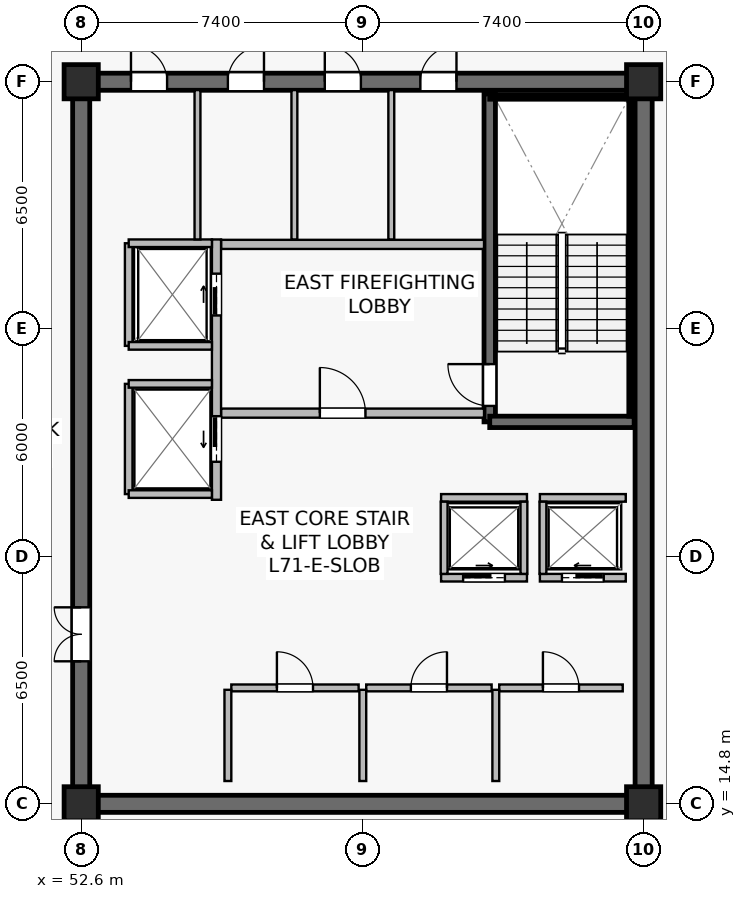
"""IFC4 building model, lengths in metres.
Left out: names, types, materials, properties, quantities, classifications, styles, units other than length and angle.
Written with IfcOpenShell. Run it as: python <this file> out.ifc"""

import sys

from ifc_helpers import new_model, si_unit, direction, frame, frame_2d, origin, origin_2d, place, context, subcontext, project, spatial, rectangle, extrude, source, transform, mapped, element, fill, save


model = new_model("IFC4")
c1 = context("Model", 3, precision=1e-05, world=origin(), true_north=direction((0.0, 1.0)))
c2 = subcontext(c1, "Body", "Model", "MODEL_VIEW")
j1 = project(units=[si_unit("LENGTHUNIT", "METRE"), si_unit("PLANEANGLEUNIT", "RADIAN")], contexts=[c1])
p1 = place(None, origin())
s1 = spatial("IfcSite", under=j1, at=p1, CompositionType="ELEMENT")
p2 = place(p1, origin())
s2 = spatial("IfcBuilding", under=s1, at=p2, CompositionType="ELEMENT")
p3 = place(p2, frame((0.0, 0.0, 297.6)))
s3 = spatial("IfcBuildingStorey", under=s2, at=p3, CompositionType="ELEMENT", Elevation=297.6)
p4 = place(p3, frame((52.375, 14.8, 0.0), z_axis=(0.0, 0.0, 1.0), x_axis=(1.0, 0.0, 0.0)))
e1 = element("IfcWall", 1, at=p4, inside=s3, PredefinedType="SHEAR", context=c2, shape_type="SweptSolid", body=[
    extrude(rectangle(XDim=15.25, YDim=0.45, at=frame_2d((7.625, 0.0))), origin(), (0.0, 0.0, 1.0), 3.9),
])
p5 = place(p3, frame((52.375, 33.8, 0.0), z_axis=(0.0, 0.0, 1.0), x_axis=(1.0, 0.0, 0.0)))
e2 = element("IfcWall", 2, at=p5, inside=s3, PredefinedType="SHEAR", context=c2, shape_type="SweptSolid", body=[
    extrude(rectangle(XDim=15.25, YDim=0.45, at=frame_2d((7.625, 0.0))), origin(), (0.0, 0.0, 1.0), 3.9),
])
p6 = place(p5, frame((9.15, 0.0, 0.0)))
e3 = element("IfcOpeningElement", 3, at=p6, cuts=e2, PredefinedType="OPENING", context=c2, shape_type="SweptSolid", body=[
    extrude(rectangle(XDim=0.95, YDim=2.15, at=frame_2d((0.475, 1.075))), frame((0.0, 0.235, 0.0), z_axis=(0.0, -1.0, 0.0), x_axis=(1.0, 0.0, 0.0)), (0.0, 0.0, 1.0), 0.47),
])
p7 = place(p5, frame((6.635, 0.0, 0.0)))
e4 = element("IfcOpeningElement", 4, at=p7, cuts=e2, PredefinedType="OPENING", context=c2, shape_type="SweptSolid", body=[
    extrude(rectangle(XDim=0.95, YDim=2.15, at=frame_2d((0.475, 1.075))), frame((0.0, 0.235, 0.0), z_axis=(0.0, -1.0, 0.0), x_axis=(1.0, 0.0, 0.0)), (0.0, 0.0, 1.0), 0.47),
])
p8 = place(p5, frame((4.085, 0.0, 0.0)))
e5 = element("IfcOpeningElement", 5, at=p8, cuts=e2, PredefinedType="OPENING", context=c2, shape_type="SweptSolid", body=[
    extrude(rectangle(XDim=0.95, YDim=2.15, at=frame_2d((0.475, 1.075))), frame((0.0, 0.235, 0.0), z_axis=(0.0, -1.0, 0.0), x_axis=(1.0, 0.0, 0.0)), (0.0, 0.0, 1.0), 0.47),
])
p9 = place(p5, frame((1.535, 0.0, 0.0)))
e6 = element("IfcOpeningElement", 6, at=p9, cuts=e2, PredefinedType="OPENING", context=c2, shape_type="SweptSolid", body=[
    extrude(rectangle(XDim=0.95, YDim=2.15, at=frame_2d((0.475, 1.075))), frame((0.0, 0.235, 0.0), z_axis=(0.0, -1.0, 0.0), x_axis=(1.0, 0.0, 0.0)), (0.0, 0.0, 1.0), 0.47),
])
p10 = place(p3, frame((52.6, 15.025, 0.0), z_axis=(0.0, 0.0, 1.0), x_axis=(0.0, 1.0, 0.0)))
e7 = element("IfcWall", 7, at=p10, inside=s3, PredefinedType="SHEAR", context=c2, shape_type="SweptSolid", body=[
    extrude(rectangle(XDim=18.55, YDim=0.45, at=frame_2d((9.275, 0.0))), origin(), (0.0, 0.0, 1.0), 3.9),
])
p11 = place(p10, frame((3.525, 0.0, 0.0)))
e8 = element("IfcOpeningElement", 8, at=p11, cuts=e7, PredefinedType="OPENING", context=c2, shape_type="SweptSolid", body=[
    extrude(rectangle(XDim=1.42, YDim=2.2, at=frame_2d((0.71, 1.1))), frame((0.0, 0.235, 0.0), z_axis=(0.0, -1.0, 0.0), x_axis=(1.0, 0.0, 0.0)), (0.0, 0.0, 1.0), 0.47),
])
p12 = place(p3, frame((67.4, 15.025, 0.0), z_axis=(0.0, 0.0, 1.0), x_axis=(0.0, 1.0, 0.0)))
e9 = element("IfcWall", 9, at=p12, inside=s3, PredefinedType="SHEAR", context=c2, shape_type="SweptSolid", body=[
    extrude(rectangle(XDim=18.55, YDim=0.45, at=frame_2d((9.275, 0.0))), origin(), (0.0, 0.0, 1.0), 3.9),
])
p13 = place(p3, frame((63.35, 24.85, 0.0), z_axis=(0.0, 0.0, 1.0), x_axis=(0.0, 1.0, 0.0)))
e10 = element("IfcWall", 10, at=p13, inside=s3, PredefinedType="SHEAR", context=c2, shape_type="SweptSolid", body=[
    extrude(rectangle(XDim=8.63, YDim=0.3, at=frame_2d((4.315, 0.0))), origin(), (0.0, 0.0, 1.0), 3.9),
])
p14 = place(p13, frame((0.42, 0.0, 0.0)))
e11 = element("IfcOpeningElement", 11, at=p14, cuts=e10, PredefinedType="OPENING", context=c2, shape_type="SweptSolid", body=[
    extrude(rectangle(XDim=1.1, YDim=2.15, at=frame_2d((0.55, 1.075))), frame((0.0, 0.16, 0.0), z_axis=(0.0, -1.0, 0.0), x_axis=(1.0, 0.0, 0.0)), (0.0, 0.0, 1.0), 0.32),
])
p15 = place(p3, frame((63.35, 24.85, 0.0), z_axis=(0.0, 0.0, 1.0), x_axis=(1.0, 0.0, 0.0)))
e12 = element("IfcWall", 12, at=p15, inside=s3, PredefinedType="SHEAR", context=c2, shape_type="SweptSolid", body=[
    extrude(rectangle(XDim=3.8, YDim=0.3, at=frame_2d((1.9, 0.0))), origin(), (0.0, 0.0, 1.0), 3.9),
])
p16 = place(p3, frame((63.35, 33.4, 0.0), z_axis=(0.0, 0.0, 1.0), x_axis=(1.0, 0.0, 0.0)))
e13 = element("IfcWall", 13, at=p16, inside=s3, PredefinedType="SOLIDWALL", context=c2, shape_type="SweptSolid", body=[
    extrude(rectangle(XDim=3.72, YDim=0.12, at=frame_2d((1.86, 0.0))), origin(), (0.0, 0.0, 1.0), 3.9),
])
p17 = place(p3, frame((67.07, 25.0, 0.0), z_axis=(0.0, 0.0, 1.0), x_axis=(0.0, 1.0, 0.0)))
e14 = element("IfcWall", 14, at=p17, inside=s3, PredefinedType="SOLIDWALL", context=c2, shape_type="SweptSolid", body=[
    extrude(rectangle(XDim=8.32, YDim=0.12, at=frame_2d((4.16, 0.0))), origin(), (0.0, 0.0, 1.0), 3.9),
])
m1 = source(origin(), c2, "Body", "SweptSolid", [
    extrude(rectangle(XDim=0.9, YDim=0.9, at=origin_2d()), origin(), (0.0, 0.0, 1.0), 4.2),
])
for number, where, z_axis, x_axis in (
    (15, (52.6, 14.8, 0.0), (0.0, 0.0, 1.0), (1.0, 0.0, 0.0)),
    (16, (67.4, 14.8, 0.0), (0.0, 0.0, 1.0), (1.0, 0.0, 0.0)),
    (17, (52.6, 33.8, 0.0), (0.0, 0.0, 1.0), (1.0, 0.0, 0.0)),
    (18, (67.4, 33.8, 0.0), (0.0, 0.0, 1.0), (1.0, 0.0, 0.0)),
):
    element("IfcColumn", number, at=place(p3, frame(where, z_axis=z_axis, x_axis=x_axis)), inside=s3, PredefinedType="COLUMN", context=c2, shape_type="MappedRepresentation", body=[
        mapped(m1, transform((0.0, 0.0, 0.0), scale=1.0)),
    ])
p18 = place(p3, frame((56.28, 25.08, 0.0), z_axis=(0.0, 0.0, 1.0), x_axis=(1.0, 0.0, 0.0)))
e19 = element("IfcWall", 19, at=p18, inside=s3, PredefinedType="SOLIDWALL", context=c2, shape_type="SweptSolid", body=[
    extrude(rectangle(XDim=6.92, YDim=0.24, at=frame_2d((3.46, 0.0))), origin(), (0.0, 0.0, 1.0), 3.297),
])
p19 = place(p18, frame((2.6, 0.0, 0.0)))
e20 = element("IfcOpeningElement", 20, at=p19, cuts=e19, PredefinedType="OPENING", context=c2, shape_type="SweptSolid", body=[
    extrude(rectangle(XDim=1.2, YDim=2.16, at=frame_2d((0.6, 1.08))), frame((0.0, 0.13, 0.0), z_axis=(0.0, -1.0, 0.0), x_axis=(1.0, 0.0, 0.0)), (0.0, 0.0, 1.0), 0.26),
])
p20 = place(p3, frame((56.28, 29.52, 0.0), z_axis=(0.0, 0.0, 1.0), x_axis=(1.0, 0.0, 0.0)))
e21 = element("IfcWall", 21, at=p20, inside=s3, PredefinedType="SOLIDWALL", context=c2, shape_type="SweptSolid", body=[
    extrude(rectangle(XDim=6.92, YDim=0.24, at=frame_2d((3.46, 0.0))), origin(), (0.0, 0.0, 1.0), 3.297),
])
p21 = place(p3, frame((56.16, 22.8, 0.0), z_axis=(0.0, 0.0, 1.0), x_axis=(0.0, 1.0, 0.0)))
e22 = element("IfcWall", 22, at=p21, inside=s3, PredefinedType="SOLIDWALL", context=c2, shape_type="SweptSolid", body=[
    extrude(rectangle(XDim=6.85, YDim=0.24, at=frame_2d((3.425, 0.0))), origin(), (0.0, 0.0, 1.0), 3.035),
])
p22 = place(p21, frame((4.85, 0.0, 0.0)))
e23 = element("IfcOpeningElement", 23, at=p22, cuts=e22, PredefinedType="OPENING", context=c2, shape_type="SweptSolid", body=[
    extrude(rectangle(XDim=1.1, YDim=2.22, at=frame_2d((0.55, 1.11))), frame((0.0, 0.13, 0.0), z_axis=(0.0, -1.0, 0.0), x_axis=(1.0, 0.0, 0.0)), (0.0, 0.0, 1.0), 0.26),
])
p23 = place(p21, frame((1.0, 0.0, 0.0)))
e24 = element("IfcOpeningElement", 24, at=p23, cuts=e22, PredefinedType="OPENING", context=c2, shape_type="SweptSolid", body=[
    extrude(rectangle(XDim=1.2, YDim=2.22, at=frame_2d((0.6, 1.11))), frame((0.0, 0.13, 0.0), z_axis=(0.0, -1.0, 0.0), x_axis=(1.0, 0.0, 0.0)), (0.0, 0.0, 1.0), 0.26),
])
p24 = place(p3, frame((64.67, 20.75, 0.0), z_axis=(0.0, 0.0, 1.0), x_axis=(1.0, 0.0, 0.0)))
e25 = element("IfcWall", 25, at=p24, inside=s3, PredefinedType="SOLIDWALL", context=c2, shape_type="SweptSolid", body=[
    extrude(rectangle(XDim=2.26, YDim=0.2, at=frame_2d((1.13, 0.0))), origin(), (0.0, 0.0, 1.0), 3.9),
])
p25 = place(p24, frame((0.58, 0.0, 0.0)))
e26 = element("IfcOpeningElement", 26, at=p25, cuts=e25, PredefinedType="OPENING", context=c2, shape_type="SweptSolid", body=[
    extrude(rectangle(XDim=1.1, YDim=2.22, at=frame_2d((0.55, 1.11))), frame((0.0, 0.11, 0.0), z_axis=(0.0, -1.0, 0.0), x_axis=(1.0, 0.0, 0.0)), (0.0, 0.0, 1.0), 0.22),
])
p26 = place(p3, frame((64.67, 22.85, 0.0), z_axis=(0.0, 0.0, 1.0), x_axis=(1.0, 0.0, 0.0)))
e27 = element("IfcWall", 27, at=p26, inside=s3, PredefinedType="SOLIDWALL", context=c2, shape_type="SweptSolid", body=[
    extrude(rectangle(XDim=2.26, YDim=0.2, at=frame_2d((1.13, 0.0))), origin(), (0.0, 0.0, 1.0), 3.9),
])
p27 = place(p3, frame((64.75, 20.85, 0.0), z_axis=(0.0, 0.0, 1.0), x_axis=(0.0, 1.0, 0.0)))
e28 = element("IfcWall", 28, at=p27, inside=s3, PredefinedType="SOLIDWALL", context=c2, shape_type="SweptSolid", body=[
    extrude(rectangle(XDim=1.9, YDim=0.18, at=frame_2d((0.95, 0.0))), origin(), (0.0, 0.0, 1.0), 3.9),
])
p28 = place(p3, frame((62.07, 20.75, 0.0), z_axis=(0.0, 0.0, 1.0), x_axis=(1.0, 0.0, 0.0)))
e29 = element("IfcWall", 29, at=p28, inside=s3, PredefinedType="SOLIDWALL", context=c2, shape_type="SweptSolid", body=[
    extrude(rectangle(XDim=2.26, YDim=0.2, at=frame_2d((1.13, 0.0))), origin(), (0.0, 0.0, 1.0), 3.9),
])
p29 = place(p28, frame((0.58, 0.0, 0.0)))
e30 = element("IfcOpeningElement", 30, at=p29, cuts=e29, PredefinedType="OPENING", context=c2, shape_type="SweptSolid", body=[
    extrude(rectangle(XDim=1.1, YDim=2.22, at=frame_2d((0.55, 1.11))), frame((0.0, 0.11, 0.0), z_axis=(0.0, -1.0, 0.0), x_axis=(1.0, 0.0, 0.0)), (0.0, 0.0, 1.0), 0.22),
])
p30 = place(p3, frame((62.07, 22.85, 0.0), z_axis=(0.0, 0.0, 1.0), x_axis=(1.0, 0.0, 0.0)))
e31 = element("IfcWall", 31, at=p30, inside=s3, PredefinedType="SOLIDWALL", context=c2, shape_type="SweptSolid", body=[
    extrude(rectangle(XDim=2.26, YDim=0.2, at=frame_2d((1.13, 0.0))), origin(), (0.0, 0.0, 1.0), 3.9),
])
for number, where, z_axis, x_axis in (
    (32, (62.15, 20.85, 0.0), (0.0, 0.0, 1.0), (0.0, 1.0, 0.0)),
    (33, (64.25, 20.85, 0.0), (0.0, 0.0, 1.0), (0.0, 1.0, 0.0)),
):
    element("IfcWall", number, at=place(p3, frame(where, z_axis=z_axis, x_axis=x_axis)), inside=s3, PredefinedType="SOLIDWALL", context=c2, shape_type="SweptSolid", body=[
        extrude(rectangle(XDim=1.9, YDim=0.18, at=frame_2d((0.95, 0.0))), origin(), (0.0, 0.0, 1.0), 3.9),
    ])
p31 = place(p3, frame((53.85, 26.85, 0.0), z_axis=(0.0, 0.0, 1.0), x_axis=(0.0, 1.0, 0.0)))
e34 = element("IfcWall", 34, at=p31, inside=s3, PredefinedType="SOLIDWALL", context=c2, shape_type="SweptSolid", body=[
    extrude(rectangle(XDim=2.7, YDim=0.2, at=frame_2d((1.35, 0.0))), origin(), (0.0, 0.0, 1.0), 3.9),
])
p32 = place(p3, frame((53.85, 29.55, 0.0), z_axis=(0.0, 0.0, 1.0), x_axis=(1.0, 0.0, 0.0)))
e35 = element("IfcWall", 35, at=p32, inside=s3, PredefinedType="SOLIDWALL", context=c2, shape_type="SweptSolid", body=[
    extrude(rectangle(XDim=2.19, YDim=0.2, at=frame_2d((1.095, 0.0))), origin(), (0.0, 0.0, 1.0), 3.9),
])
p33 = place(p3, frame((53.85, 26.85, 0.0), z_axis=(0.0, 0.0, 1.0), x_axis=(1.0, 0.0, 0.0)))
e36 = element("IfcWall", 36, at=p33, inside=s3, PredefinedType="SOLIDWALL", context=c2, shape_type="SweptSolid", body=[
    extrude(rectangle(XDim=2.19, YDim=0.2, at=frame_2d((1.095, 0.0))), origin(), (0.0, 0.0, 1.0), 3.297),
])
p34 = place(p3, frame((53.85, 22.95, 0.0), z_axis=(0.0, 0.0, 1.0), x_axis=(0.0, 1.0, 0.0)))
e37 = element("IfcWall", 37, at=p34, inside=s3, PredefinedType="SOLIDWALL", context=c2, shape_type="SweptSolid", body=[
    extrude(rectangle(XDim=2.9, YDim=0.2, at=frame_2d((1.45, 0.0))), origin(), (0.0, 0.0, 1.0), 3.035),
])
for number, where, z_axis, x_axis in (
    (38, (53.85, 25.85, 0.0), (0.0, 0.0, 1.0), (1.0, 0.0, 0.0)),
    (39, (53.85, 22.95, 0.0), (0.0, 0.0, 1.0), (1.0, 0.0, 0.0)),
):
    element("IfcWall", number, at=place(p3, frame(where, z_axis=z_axis, x_axis=x_axis)), inside=s3, PredefinedType="SOLIDWALL", context=c2, shape_type="SweptSolid", body=[
        extrude(rectangle(XDim=2.19, YDim=0.2, at=frame_2d((1.095, 0.0))), origin(), (0.0, 0.0, 1.0), 3.9),
    ])
p35 = place(p3, frame((63.6, 17.85, 0.0), z_axis=(0.0, 0.0, 1.0), x_axis=(1.0, 0.0, 0.0)))
e40 = element("IfcWall", 40, at=p35, inside=s3, PredefinedType="SOLIDWALL", context=c2, shape_type="SweptSolid", body=[
    extrude(rectangle(XDim=3.25, YDim=0.18, at=frame_2d((1.625, 0.0))), origin(), (0.0, 0.0, 1.0), 3.9),
])
p36 = place(p35, frame((1.15, 0.0, 0.0)))
e41 = element("IfcOpeningElement", 41, at=p36, cuts=e40, PredefinedType="OPENING", context=c2, shape_type="SweptSolid", body=[
    extrude(rectangle(XDim=0.95, YDim=2.15, at=frame_2d((0.475, 1.075))), frame((0.0, 0.1, 0.0), z_axis=(0.0, -1.0, 0.0), x_axis=(1.0, 0.0, 0.0)), (0.0, 0.0, 1.0), 0.2),
])
p37 = place(p3, frame((63.51, 15.4, 0.0), z_axis=(0.0, 0.0, 1.0), x_axis=(0.0, 1.0, 0.0)))
e42 = element("IfcWall", 42, at=p37, inside=s3, PredefinedType="SOLIDWALL", context=c2, shape_type="SweptSolid", body=[
    extrude(rectangle(XDim=2.4, YDim=0.18, at=frame_2d((1.2, 0.0))), origin(), (0.0, 0.0, 1.0), 3.9),
])
p38 = place(p3, frame((60.1, 17.85, 0.0), z_axis=(0.0, 0.0, 1.0), x_axis=(1.0, 0.0, 0.0)))
e43 = element("IfcWall", 43, at=p38, inside=s3, PredefinedType="SOLIDWALL", context=c2, shape_type="SweptSolid", body=[
    extrude(rectangle(XDim=3.3, YDim=0.18, at=frame_2d((1.65, 0.0))), origin(), (0.0, 0.0, 1.0), 3.297),
])
p39 = place(p38, frame((1.175, 0.0, 0.0)))
e44 = element("IfcOpeningElement", 44, at=p39, cuts=e43, PredefinedType="OPENING", context=c2, shape_type="SweptSolid", body=[
    extrude(rectangle(XDim=0.95, YDim=2.15, at=frame_2d((0.475, 1.075))), frame((0.0, 0.1, 0.0), z_axis=(0.0, -1.0, 0.0), x_axis=(1.0, 0.0, 0.0)), (0.0, 0.0, 1.0), 0.2),
])
p40 = place(p3, frame((60.01, 15.4, 0.0), z_axis=(0.0, 0.0, 1.0), x_axis=(0.0, 1.0, 0.0)))
e45 = element("IfcWall", 45, at=p40, inside=s3, PredefinedType="SOLIDWALL", context=c2, shape_type="SweptSolid", body=[
    extrude(rectangle(XDim=2.4, YDim=0.18, at=frame_2d((1.2, 0.0))), origin(), (0.0, 0.0, 1.0), 3.297),
])
p41 = place(p3, frame((56.55, 17.85, 0.0), z_axis=(0.0, 0.0, 1.0), x_axis=(1.0, 0.0, 0.0)))
e46 = element("IfcWall", 46, at=p41, inside=s3, PredefinedType="SOLIDWALL", context=c2, shape_type="SweptSolid", body=[
    extrude(rectangle(XDim=3.35, YDim=0.18, at=frame_2d((1.675, 0.0))), origin(), (0.0, 0.0, 1.0), 3.297),
])
p42 = place(p41, frame((1.2, 0.0, 0.0)))
e47 = element("IfcOpeningElement", 47, at=p42, cuts=e46, PredefinedType="OPENING", context=c2, shape_type="SweptSolid", body=[
    extrude(rectangle(XDim=0.95, YDim=2.15, at=frame_2d((0.475, 1.075))), frame((0.0, 0.1, 0.0), z_axis=(0.0, -1.0, 0.0), x_axis=(1.0, 0.0, 0.0)), (0.0, 0.0, 1.0), 0.2),
])
p43 = place(p3, frame((56.46, 15.4, 0.0), z_axis=(0.0, 0.0, 1.0), x_axis=(0.0, 1.0, 0.0)))
e48 = element("IfcWall", 48, at=p43, inside=s3, PredefinedType="SOLIDWALL", context=c2, shape_type="SweptSolid", body=[
    extrude(rectangle(XDim=2.4, YDim=0.18, at=frame_2d((1.2, 0.0))), origin(), (0.0, 0.0, 1.0), 3.9),
])
for number, where, z_axis, x_axis in (
    (49, (60.76, 29.65, 0.0), (0.0, 0.0, 1.0), (0.0, 1.0, 0.0)),
    (50, (58.21, 29.65, 0.0), (0.0, 0.0, 1.0), (0.0, 1.0, 0.0)),
    (51, (55.66, 29.65, 0.0), (0.0, 0.0, 1.0), (0.0, 1.0, 0.0)),
):
    element("IfcWall", number, at=place(p3, frame(where, z_axis=z_axis, x_axis=x_axis)), inside=s3, PredefinedType="PLUMBINGWALL", context=c2, shape_type="SweptSolid", body=[
        extrude(rectangle(XDim=3.93, YDim=0.155, at=frame_2d((1.965, 0.0))), origin(), (0.0, 0.0, 1.0), 3.9),
    ])
m2 = source(origin(), c2, "Body", "SweptSolid", [
    extrude(rectangle(XDim=1.1, YDim=2.15, at=frame_2d((0.55, 1.075))), frame((0.0, 0.025, 0.0), z_axis=(0.0, -1.0, 0.0), x_axis=(1.0, 0.0, 0.0)), (0.0, 0.0, 1.0), 0.05),
])
p44 = place(p14, origin())
e52 = element("IfcDoor", 52, at=p44, inside=s3, OperationType="SINGLE_SWING_RIGHT", PredefinedType="DOOR", context=c2, shape_type="MappedRepresentation", body=[
    mapped(m2, transform((0.0, 0.0, 0.0), scale=1.0)),
])
fill(e11, e52)
m3 = source(origin(), c2, "Body", "SweptSolid", [
    extrude(rectangle(XDim=1.2, YDim=2.16, at=frame_2d((0.6, 1.08))), frame((0.0, 0.025, 0.0), z_axis=(0.0, -1.0, 0.0), x_axis=(1.0, 0.0, 0.0)), (0.0, 0.0, 1.0), 0.05),
])
p45 = place(p19, origin())
e53 = element("IfcDoor", 53, at=p45, inside=s3, OperationType="SINGLE_SWING_LEFT", PredefinedType="DOOR", context=c2, shape_type="MappedRepresentation", body=[
    mapped(m3, transform((0.0, 0.0, 0.0), scale=1.0)),
])
fill(e20, e53)
m4 = source(origin(), c2, "Body", "SweptSolid", [
    extrude(rectangle(XDim=1.1, YDim=2.22, at=frame_2d((0.55, 1.11))), frame((0.0, 0.025, 0.0), z_axis=(0.0, -1.0, 0.0), x_axis=(1.0, 0.0, 0.0)), (0.0, 0.0, 1.0), 0.05),
])
p46 = place(p25, origin())
e54 = element("IfcDoor", 54, at=p46, inside=s3, OperationType="SLIDING_TO_LEFT", PredefinedType="USERDEFINED", context=c2, shape_type="MappedRepresentation", body=[
    mapped(m4, transform((0.0, 0.0, 0.0), scale=1.0)),
])
fill(e26, e54)
p47 = place(p29, origin())
e55 = element("IfcDoor", 55, at=p47, inside=s3, OperationType="SLIDING_TO_RIGHT", PredefinedType="USERDEFINED", context=c2, shape_type="MappedRepresentation", body=[
    mapped(m4, transform((0.0, 0.0, 0.0), scale=1.0)),
])
fill(e30, e55)
p48 = place(p22, origin())
e56 = element("IfcDoor", 56, at=p48, inside=s3, OperationType="SLIDING_TO_RIGHT", PredefinedType="USERDEFINED", context=c2, shape_type="MappedRepresentation", body=[
    mapped(m4, transform((0.0, 0.0, 0.0), scale=1.0)),
])
fill(e23, e56)
m5 = source(origin(), c2, "Body", "SweptSolid", [
    extrude(rectangle(XDim=1.2, YDim=2.22, at=frame_2d((0.6, 1.11))), frame((0.0, 0.025, 0.0), z_axis=(0.0, -1.0, 0.0), x_axis=(1.0, 0.0, 0.0)), (0.0, 0.0, 1.0), 0.05),
])
p49 = place(p23, origin())
e57 = element("IfcDoor", 57, at=p49, inside=s3, OperationType="SLIDING_TO_LEFT", PredefinedType="USERDEFINED", context=c2, shape_type="MappedRepresentation", body=[
    mapped(m5, transform((0.0, 0.0, 0.0), scale=1.0)),
])
fill(e24, e57)
m6 = source(origin(), c2, "Body", "SweptSolid", [
    extrude(rectangle(XDim=0.95, YDim=2.15, at=frame_2d((0.475, 1.075))), frame((0.0, 0.025, 0.0), z_axis=(0.0, -1.0, 0.0), x_axis=(1.0, 0.0, 0.0)), (0.0, 0.0, 1.0), 0.05),
])
p50 = place(p36, origin())
e58 = element("IfcDoor", 58, at=p50, inside=s3, OperationType="SINGLE_SWING_LEFT", PredefinedType="DOOR", context=c2, shape_type="MappedRepresentation", body=[
    mapped(m6, transform((0.0, 0.0, 0.0), scale=1.0)),
])
fill(e41, e58)
p51 = place(p39, origin())
e59 = element("IfcDoor", 59, at=p51, inside=s3, OperationType="SINGLE_SWING_RIGHT", PredefinedType="DOOR", context=c2, shape_type="MappedRepresentation", body=[
    mapped(m6, transform((0.0, 0.0, 0.0), scale=1.0)),
])
fill(e44, e59)
p52 = place(p42, origin())
e60 = element("IfcDoor", 60, at=p52, inside=s3, OperationType="SINGLE_SWING_LEFT", PredefinedType="DOOR", context=c2, shape_type="MappedRepresentation", body=[
    mapped(m6, transform((0.0, 0.0, 0.0), scale=1.0)),
])
fill(e47, e60)
m7 = source(origin(), c2, "Body", "SweptSolid", [
    extrude(rectangle(XDim=1.42, YDim=2.2, at=frame_2d((0.71, 1.1))), frame((0.0, 0.025, 0.0), z_axis=(0.0, -1.0, 0.0), x_axis=(1.0, 0.0, 0.0)), (0.0, 0.0, 1.0), 0.05),
])
p53 = place(p11, origin())
e61 = element("IfcDoor", 61, at=p53, inside=s3, OperationType="DOUBLE_DOOR_SINGLE_SWING", PredefinedType="DOOR", context=c2, shape_type="MappedRepresentation", body=[
    mapped(m7, transform((0.0, 0.0, 0.0), scale=1.0)),
])
fill(e8, e61)
p54 = place(p6, origin())
e62 = element("IfcDoor", 62, at=p54, inside=s3, OperationType="SINGLE_SWING_RIGHT", PredefinedType="DOOR", context=c2, shape_type="MappedRepresentation", body=[
    mapped(m6, transform((0.0, 0.0, 0.0), scale=1.0)),
])
fill(e3, e62)
p55 = place(p7, origin())
e63 = element("IfcDoor", 63, at=p55, inside=s3, OperationType="SINGLE_SWING_LEFT", PredefinedType="DOOR", context=c2, shape_type="MappedRepresentation", body=[
    mapped(m6, transform((0.0, 0.0, 0.0), scale=1.0)),
])
fill(e4, e63)
p56 = place(p8, origin())
e64 = element("IfcDoor", 64, at=p56, inside=s3, OperationType="SINGLE_SWING_RIGHT", PredefinedType="DOOR", context=c2, shape_type="MappedRepresentation", body=[
    mapped(m6, transform((0.0, 0.0, 0.0), scale=1.0)),
])
fill(e5, e64)
p57 = place(p9, origin())
e65 = element("IfcDoor", 65, at=p57, inside=s3, OperationType="SINGLE_SWING_LEFT", PredefinedType="DOOR", context=c2, shape_type="MappedRepresentation", body=[
    mapped(m6, transform((0.0, 0.0, 0.0), scale=1.0)),
])
fill(e6, e65)
save(model, sys.argv[1])
